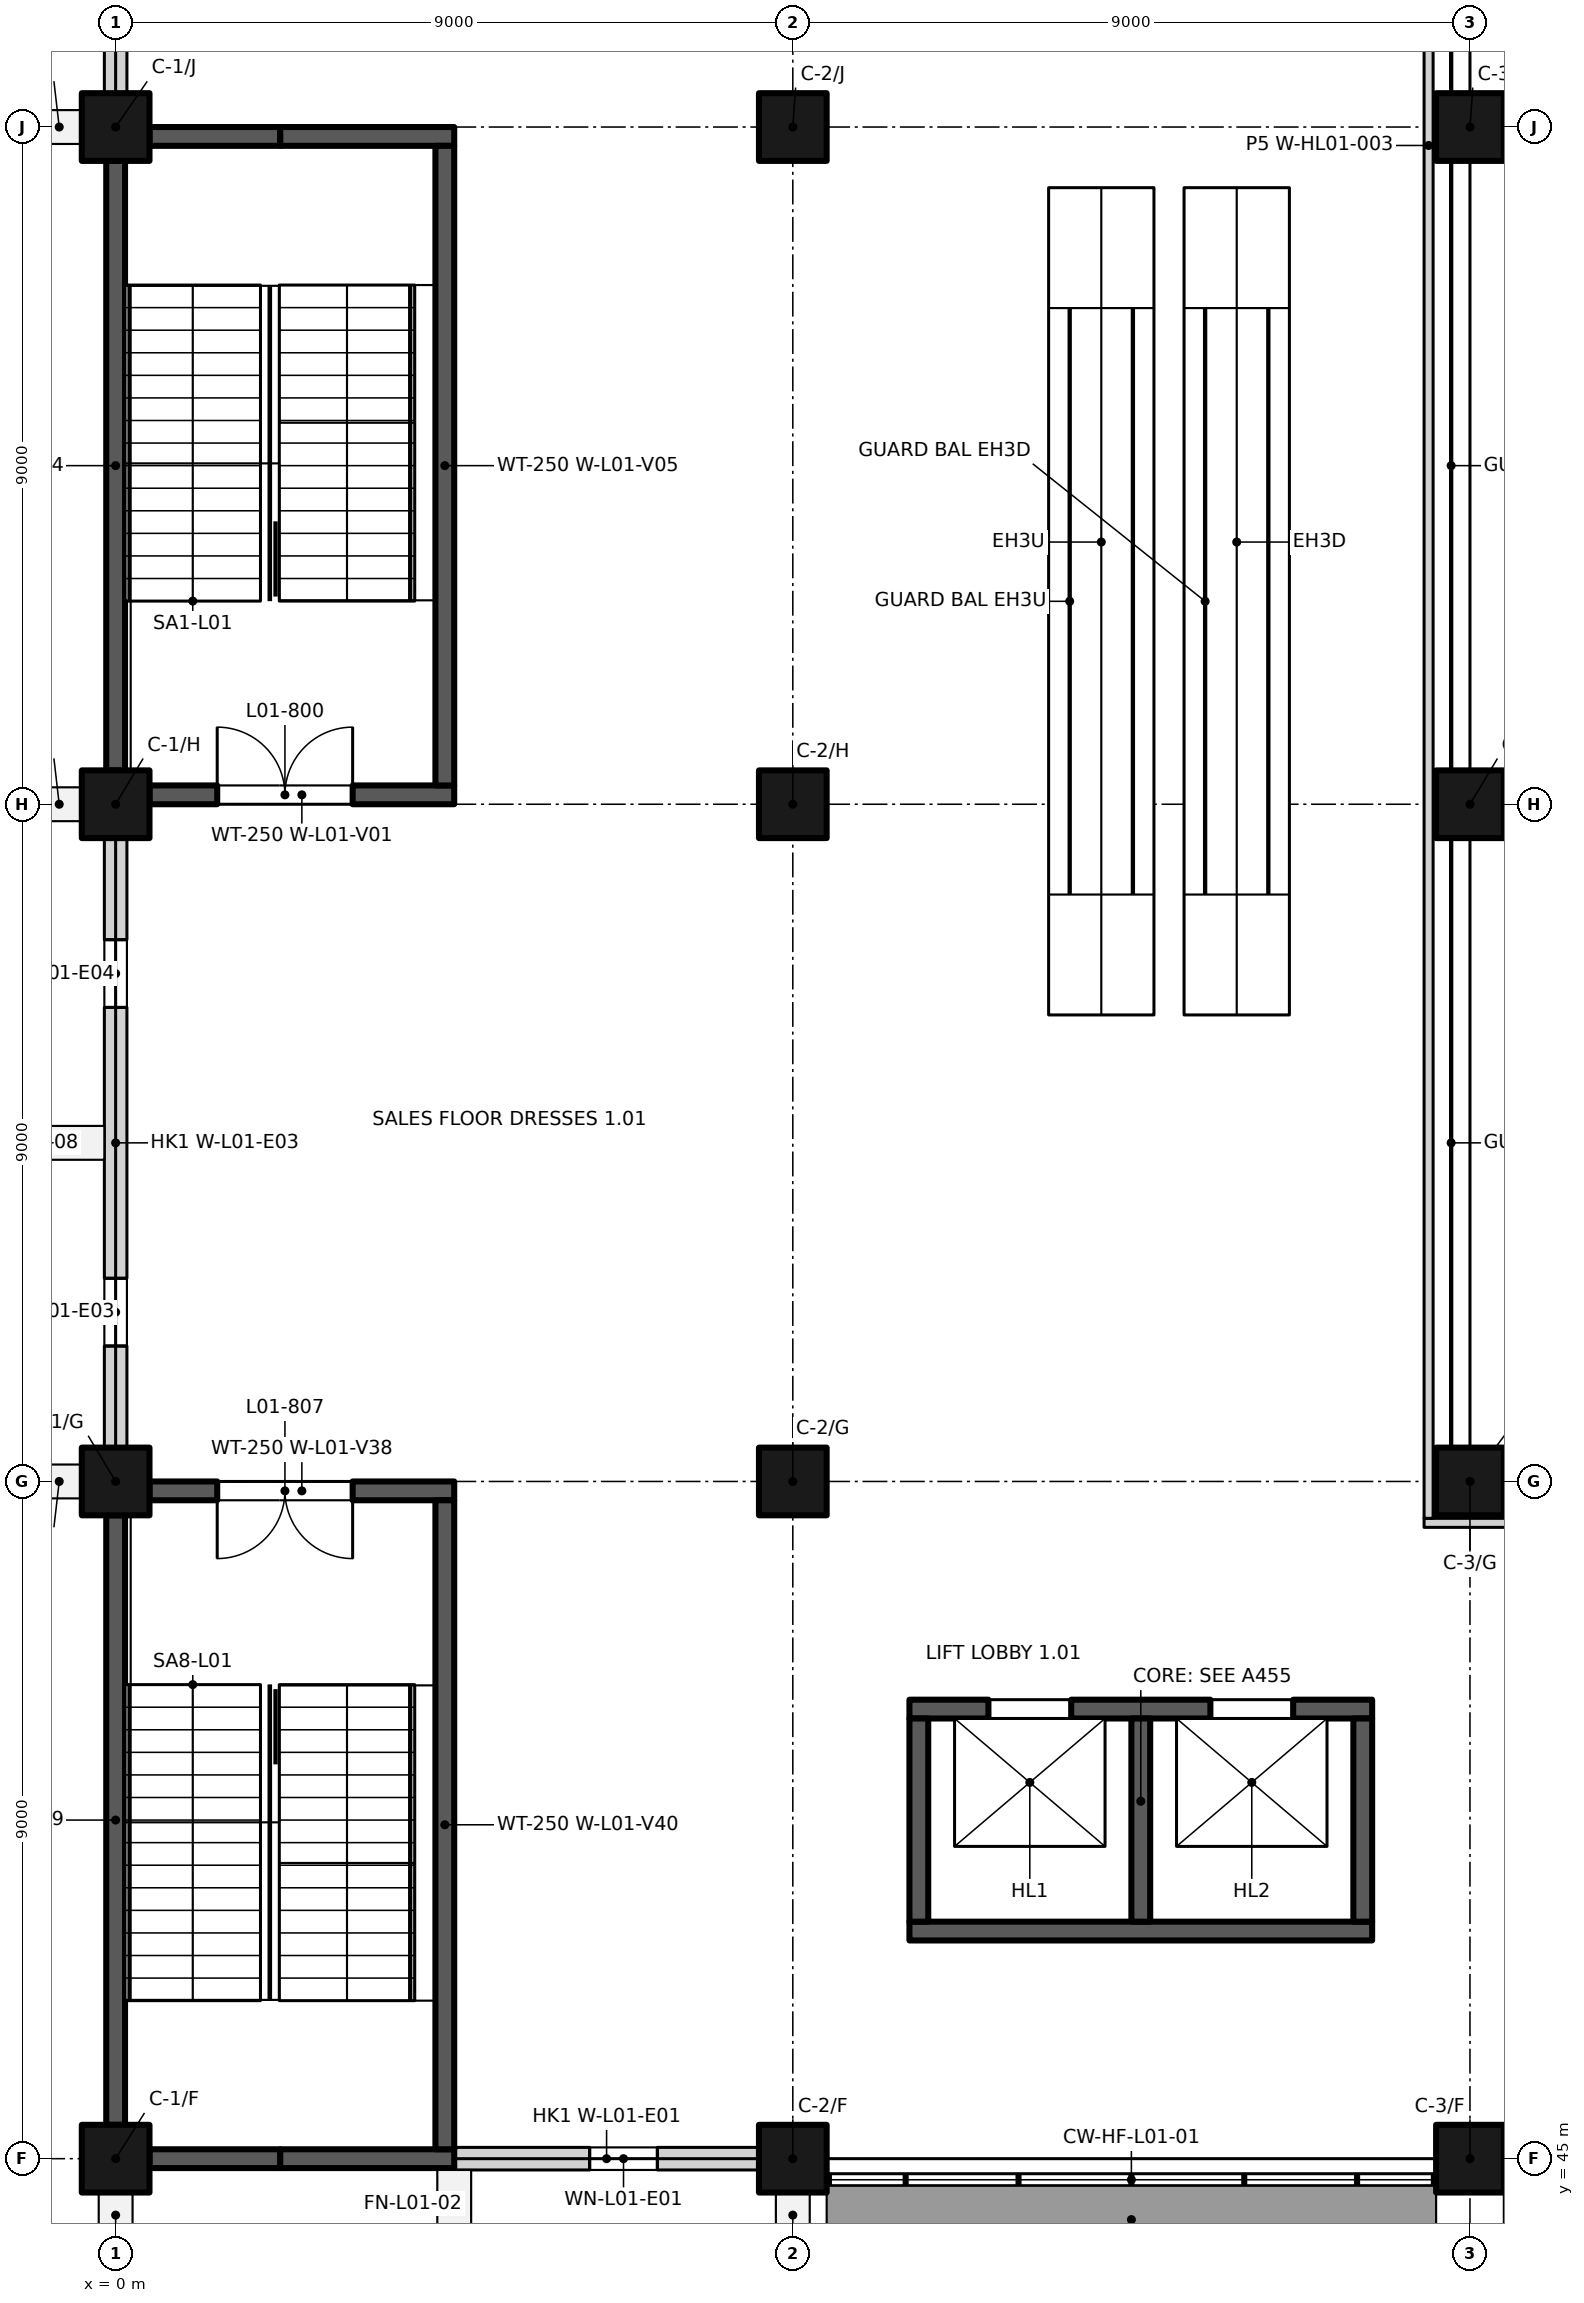
"""IFC4 building model, lengths in metres.
Left out: names, types, materials, properties, quantities, classifications, styles, units other than length and angle.
Written with IfcOpenShell. Run it as: python <this file> out.ifc"""

import sys

from ifc_helpers import new_model, si_unit, direction, frame, frame_2d, origin, origin_2d, place, context, subcontext, project, spatial, rectangle, extrude, element, fill, save


model = new_model("IFC4")
c1 = context("Model", 3, precision=1e-05, world=origin(), true_north=direction((0.0, 1.0)))
c2 = subcontext(c1, "Body", "Model", "MODEL_VIEW")
j1 = project(units=[si_unit("LENGTHUNIT", "METRE"), si_unit("PLANEANGLEUNIT", "RADIAN")], contexts=[c1])
p1 = place(None, origin())
s1 = spatial("IfcSite", under=j1, at=p1, CompositionType="ELEMENT")
p2 = place(p1, origin())
s2 = spatial("IfcBuilding", under=s1, at=p2, CompositionType="ELEMENT")
p3 = place(p2, frame((0.0, 0.0, 6.0)))
s3 = spatial("IfcBuildingStorey", under=s2, at=p3, CompositionType="ELEMENT", Elevation=6.0)
for number, where, z_axis, x_axis in (
    (1, (0.0, 45.0, 0.0), (0.0, 0.0, 1.0), (1.0, 0.0, 0.0)),
    (2, (9.0, 45.0, 0.0), (0.0, 0.0, 1.0), (1.0, 0.0, 0.0)),
    (3, (18.0, 45.0, 0.0), (0.0, 0.0, 1.0), (1.0, 0.0, 0.0)),
    (4, (0.0, 54.0, 0.0), (0.0, 0.0, 1.0), (1.0, 0.0, 0.0)),
    (5, (9.0, 54.0, 0.0), (0.0, 0.0, 1.0), (1.0, 0.0, 0.0)),
    (6, (18.0, 54.0, 0.0), (0.0, 0.0, 1.0), (1.0, 0.0, 0.0)),
    (7, (0.0, 63.0, 0.0), (0.0, 0.0, 1.0), (1.0, 0.0, 0.0)),
    (8, (9.0, 63.0, 0.0), (0.0, 0.0, 1.0), (1.0, 0.0, 0.0)),
    (9, (18.0, 63.0, 0.0), (0.0, 0.0, 1.0), (1.0, 0.0, 0.0)),
    (10, (0.0, 72.0, 0.0), (0.0, 0.0, 1.0), (1.0, 0.0, 0.0)),
    (11, (9.0, 72.0, 0.0), (0.0, 0.0, 1.0), (1.0, 0.0, 0.0)),
    (12, (18.0, 72.0, 0.0), (0.0, 0.0, 1.0), (1.0, 0.0, 0.0)),
):
    element("IfcColumn", number, at=place(p3, frame(where, z_axis=z_axis, x_axis=x_axis)), inside=s3, PredefinedType="COLUMN", context=c2, shape_type="SweptSolid", body=[
        extrude(rectangle(XDim=0.9, YDim=0.9, at=origin_2d()), origin(), (0.0, 0.0, 1.0), 4.5),
    ])
p4 = place(p3, frame((0.45, 63.125, 0.0), z_axis=(0.0, 0.0, 1.0), x_axis=(1.0, 0.0, 0.0)))
e13 = element("IfcWall", 13, at=p4, inside=s3, PredefinedType="SHEAR", context=c2, shape_type="SweptSolid", body=[
    extrude(rectangle(XDim=4.05, YDim=0.25, at=frame_2d((2.025, 0.0))), origin(), (0.0, 0.0, 1.0), 4.5),
])
p5 = place(p4, frame((0.9, 0.0, 0.0)))
e14 = element("IfcOpeningElement", 14, at=p5, cuts=e13, PredefinedType="OPENING", context=c2, shape_type="SweptSolid", body=[
    extrude(rectangle(XDim=1.8, YDim=2.1, at=frame_2d((0.9, 1.05))), frame((0.0, 0.135, 0.0), z_axis=(0.0, -1.0, 0.0), x_axis=(1.0, 0.0, 0.0)), (0.0, 0.0, 1.0), 0.27),
])
p6 = place(p3, frame((0.45, 71.875, 0.0), z_axis=(0.0, 0.0, 1.0), x_axis=(1.0, 0.0, 0.0)))
e15 = element("IfcWall", 15, at=p6, inside=s3, PredefinedType="SHEAR", context=c2, shape_type="SweptSolid", body=[
    extrude(rectangle(XDim=1.738, YDim=0.25, at=frame_2d((0.869, 0.0))), origin(), (0.0, 0.0, 1.0), 4.5),
])
p7 = place(p3, frame((2.188, 71.875, 0.0), z_axis=(0.0, 0.0, 1.0), x_axis=(1.0, 0.0, 0.0)))
e16 = element("IfcWall", 16, at=p7, inside=s3, PredefinedType="SHEAR", context=c2, shape_type="SweptSolid", body=[
    extrude(rectangle(XDim=2.312, YDim=0.25, at=frame_2d((1.156, 0.0))), origin(), (0.0, 0.0, 1.0), 4.5),
])
p8 = place(p3, frame((0.0, 63.45, 0.0), z_axis=(0.0, 0.0, 1.0), x_axis=(0.0, 1.0, 0.0)))
e17 = element("IfcWall", 17, at=p8, inside=s3, PredefinedType="SHEAR", context=c2, shape_type="SweptSolid", body=[
    extrude(rectangle(XDim=8.1, YDim=0.25, at=frame_2d((4.05, 0.0))), origin(), (0.0, 0.0, 1.0), 4.5),
])
p9 = place(p3, frame((4.375, 63.25, 0.0), z_axis=(0.0, 0.0, 1.0), x_axis=(0.0, 1.0, 0.0)))
e18 = element("IfcWall", 18, at=p9, inside=s3, PredefinedType="SHEAR", context=c2, shape_type="SweptSolid", body=[
    extrude(rectangle(XDim=8.5, YDim=0.25, at=frame_2d((4.25, 0.0))), origin(), (0.0, 0.0, 1.0), 4.5),
])
p10 = place(p3, frame((0.45, 45.0, 0.0), z_axis=(0.0, 0.0, 1.0), x_axis=(1.0, 0.0, 0.0)))
e19 = element("IfcWall", 19, at=p10, inside=s3, PredefinedType="SHEAR", context=c2, shape_type="SweptSolid", body=[
    extrude(rectangle(XDim=1.738, YDim=0.25, at=frame_2d((0.869, 0.0))), origin(), (0.0, 0.0, 1.0), 4.5),
])
p11 = place(p3, frame((2.188, 45.0, 0.0), z_axis=(0.0, 0.0, 1.0), x_axis=(1.0, 0.0, 0.0)))
e20 = element("IfcWall", 20, at=p11, inside=s3, PredefinedType="SHEAR", context=c2, shape_type="SweptSolid", body=[
    extrude(rectangle(XDim=2.312, YDim=0.25, at=frame_2d((1.156, 0.0))), origin(), (0.0, 0.0, 1.0), 4.5),
])
p12 = place(p3, frame((0.45, 53.875, 0.0), z_axis=(0.0, 0.0, 1.0), x_axis=(1.0, 0.0, 0.0)))
e21 = element("IfcWall", 21, at=p12, inside=s3, PredefinedType="SHEAR", context=c2, shape_type="SweptSolid", body=[
    extrude(rectangle(XDim=4.05, YDim=0.25, at=frame_2d((2.025, 0.0))), origin(), (0.0, 0.0, 1.0), 4.5),
])
p13 = place(p12, frame((2.7, 0.0, 0.0), z_axis=(0.0, 0.0, 1.0), x_axis=(-1.0, 0.0, 0.0)))
e22 = element("IfcOpeningElement", 22, at=p13, cuts=e21, PredefinedType="OPENING", context=c2, shape_type="SweptSolid", body=[
    extrude(rectangle(XDim=1.8, YDim=2.1, at=frame_2d((0.9, 1.05))), frame((0.0, 0.135, 0.0), z_axis=(0.0, -1.0, 0.0), x_axis=(1.0, 0.0, 0.0)), (0.0, 0.0, 1.0), 0.27),
])
p14 = place(p3, frame((0.0, 45.45, 0.0), z_axis=(0.0, 0.0, 1.0), x_axis=(0.0, 1.0, 0.0)))
e23 = element("IfcWall", 23, at=p14, inside=s3, PredefinedType="SHEAR", context=c2, shape_type="SweptSolid", body=[
    extrude(rectangle(XDim=8.1, YDim=0.25, at=frame_2d((4.05, 0.0))), origin(), (0.0, 0.0, 1.0), 4.5),
])
p15 = place(p3, frame((4.375, 45.125, 0.0), z_axis=(0.0, 0.0, 1.0), x_axis=(0.0, 1.0, 0.0)))
e24 = element("IfcWall", 24, at=p15, inside=s3, PredefinedType="SHEAR", context=c2, shape_type="SweptSolid", body=[
    extrude(rectangle(XDim=8.625, YDim=0.25, at=frame_2d((4.312, 0.0))), origin(), (0.0, 0.0, 1.0), 4.5),
])
p16 = place(p3, frame((10.55, 50.975, 0.0), z_axis=(0.0, 0.0, 1.0), x_axis=(1.0, 0.0, 0.0)))
e25 = element("IfcWall", 25, at=p16, inside=s3, PredefinedType="SHEAR", context=c2, shape_type="SweptSolid", body=[
    extrude(rectangle(XDim=6.15, YDim=0.25, at=frame_2d((3.075, 0.0))), origin(), (0.0, 0.0, 1.0), 4.5),
])
p17 = place(p16, frame((1.05, 0.0, 0.0)))
e26 = element("IfcOpeningElement", 26, at=p17, cuts=e25, PredefinedType="OPENING", context=c2, shape_type="SweptSolid", body=[
    extrude(rectangle(XDim=1.1, YDim=2.1, at=frame_2d((0.55, 1.05))), frame((0.0, 0.135, 0.0), z_axis=(0.0, -1.0, 0.0), x_axis=(1.0, 0.0, 0.0)), (0.0, 0.0, 1.0), 0.27),
])
p18 = place(p16, frame((4.0, 0.0, 0.0)))
e27 = element("IfcOpeningElement", 27, at=p18, cuts=e25, PredefinedType="OPENING", context=c2, shape_type="SweptSolid", body=[
    extrude(rectangle(XDim=1.1, YDim=2.1, at=frame_2d((0.55, 1.05))), frame((0.0, 0.135, 0.0), z_axis=(0.0, -1.0, 0.0), x_axis=(1.0, 0.0, 0.0)), (0.0, 0.0, 1.0), 0.27),
])
p19 = place(p3, frame((10.55, 48.025, 0.0), z_axis=(0.0, 0.0, 1.0), x_axis=(1.0, 0.0, 0.0)))
e28 = element("IfcWall", 28, at=p19, inside=s3, PredefinedType="SHEAR", context=c2, shape_type="SweptSolid", body=[
    extrude(rectangle(XDim=6.15, YDim=0.25, at=frame_2d((3.075, 0.0))), origin(), (0.0, 0.0, 1.0), 4.5),
])
for number, where, z_axis, x_axis in (
    (29, (10.675, 48.15, 0.0), (0.0, 0.0, 1.0), (0.0, 1.0, 0.0)),
    (30, (13.625, 48.15, 0.0), (0.0, 0.0, 1.0), (0.0, 1.0, 0.0)),
    (31, (16.575, 48.15, 0.0), (0.0, 0.0, 1.0), (0.0, 1.0, 0.0)),
):
    element("IfcWall", number, at=place(p3, frame(where, z_axis=z_axis, x_axis=x_axis)), inside=s3, PredefinedType="SHEAR", context=c2, shape_type="SweptSolid", body=[
        extrude(rectangle(XDim=2.7, YDim=0.25, at=frame_2d((1.35, 0.0))), origin(), (0.0, 0.0, 1.0), 4.5),
    ])
p20 = place(p3, frame((8.55, 45.0, 0.0), z_axis=(0.0, 0.0, 1.0), x_axis=(-1.0, 0.0, 0.0)))
e32 = element("IfcWall", 32, at=p20, inside=s3, PredefinedType="SOLIDWALL", context=c2, shape_type="SweptSolid", body=[
    extrude(rectangle(XDim=4.05, YDim=0.3, at=frame_2d((2.025, 0.0))), origin(), (0.0, 0.0, 1.0), 3.7),
])
p21 = place(p20, frame((1.35, 0.0, 0.45)))
e33 = element("IfcOpeningElement", 33, at=p21, cuts=e32, PredefinedType="OPENING", context=c2, shape_type="SweptSolid", body=[
    extrude(rectangle(XDim=0.9, YDim=3.0, at=frame_2d((0.45, 1.5))), frame((0.0, 0.16, 0.0), z_axis=(0.0, -1.0, 0.0), x_axis=(1.0, 0.0, 0.0)), (0.0, 0.0, 1.0), 0.32),
])
p22 = place(p3, frame((0.0, 54.45, 0.0), z_axis=(0.0, 0.0, 1.0), x_axis=(0.0, 1.0, 0.0)))
e34 = element("IfcWall", 34, at=p22, inside=s3, PredefinedType="SOLIDWALL", context=c2, shape_type="SweptSolid", body=[
    extrude(rectangle(XDim=8.1, YDim=0.3, at=frame_2d((4.05, 0.0))), origin(), (0.0, 0.0, 1.0), 3.7),
])
p23 = place(p22, frame((1.35, 0.0, 0.45)))
e35 = element("IfcOpeningElement", 35, at=p23, cuts=e34, PredefinedType="OPENING", context=c2, shape_type="SweptSolid", body=[
    extrude(rectangle(XDim=0.9, YDim=3.0, at=frame_2d((0.45, 1.5))), frame((0.0, 0.16, 0.0), z_axis=(0.0, -1.0, 0.0), x_axis=(1.0, 0.0, 0.0)), (0.0, 0.0, 1.0), 0.32),
])
p24 = place(p22, frame((5.85, 0.0, 0.45)))
e36 = element("IfcOpeningElement", 36, at=p24, cuts=e34, PredefinedType="OPENING", context=c2, shape_type="SweptSolid", body=[
    extrude(rectangle(XDim=0.9, YDim=3.0, at=frame_2d((0.45, 1.5))), frame((0.0, 0.16, 0.0), z_axis=(0.0, -1.0, 0.0), x_axis=(1.0, 0.0, 0.0)), (0.0, 0.0, 1.0), 0.32),
])
p25 = place(p3, frame((0.0, 72.45, 0.0), z_axis=(0.0, 0.0, 1.0), x_axis=(0.0, 1.0, 0.0)))
e37 = element("IfcWall", 37, at=p25, inside=s3, PredefinedType="SOLIDWALL", context=c2, shape_type="SweptSolid", body=[
    extrude(rectangle(XDim=8.1, YDim=0.3, at=frame_2d((4.05, 0.0))), origin(), (0.0, 0.0, 1.0), 3.7),
])
p26 = place(p25, frame((1.35, 0.0, 0.45)))
e38 = element("IfcOpeningElement", 38, at=p26, cuts=e37, PredefinedType="OPENING", context=c2, shape_type="SweptSolid", body=[
    extrude(rectangle(XDim=0.9, YDim=3.0, at=frame_2d((0.45, 1.5))), frame((0.0, 0.16, 0.0), z_axis=(0.0, -1.0, 0.0), x_axis=(1.0, 0.0, 0.0)), (0.0, 0.0, 1.0), 0.32),
])
p27 = place(p25, frame((5.85, 0.0, 0.45)))
e39 = element("IfcOpeningElement", 39, at=p27, cuts=e37, PredefinedType="OPENING", context=c2, shape_type="SweptSolid", body=[
    extrude(rectangle(XDim=0.9, YDim=3.0, at=frame_2d((0.45, 1.5))), frame((0.0, 0.16, 0.0), z_axis=(0.0, -1.0, 0.0), x_axis=(1.0, 0.0, 0.0)), (0.0, 0.0, 1.0), 0.32),
])
p28 = place(p3, frame((17.39, 53.45, 0.0), z_axis=(0.0, 0.0, 1.0), x_axis=(1.0, 0.0, 0.0)))
e40 = element("IfcWall", 40, at=p28, inside=s3, PredefinedType="PARTITIONING", context=c2, shape_type="SweptSolid", body=[
    extrude(rectangle(XDim=16.71, YDim=0.12, at=frame_2d((8.355, 0.0))), origin(), (0.0, 0.0, 1.0), 3.7),
])
p29 = place(p3, frame((17.45, 53.51, 0.0), z_axis=(0.0, 0.0, 1.0), x_axis=(0.0, 1.0, 0.0)))
e41 = element("IfcWall", 41, at=p29, inside=s3, PredefinedType="PARTITIONING", context=c2, shape_type="SweptSolid", body=[
    extrude(rectangle(XDim=36.655, YDim=0.12, at=frame_2d((18.328, 0.0))), origin(), (0.0, 0.0, 1.0), 3.7),
])
p30 = place(p5, origin())
e42 = element("IfcDoor", 42, at=p30, inside=s3, OperationType="DOUBLE_DOOR_SINGLE_SWING", PredefinedType="DOOR", context=c2, shape_type="SweptSolid", body=[
    extrude(rectangle(XDim=1.8, YDim=2.1, at=frame_2d((0.9, 1.05))), frame((0.0, 0.025, 0.0), z_axis=(0.0, -1.0, 0.0), x_axis=(1.0, 0.0, 0.0)), (0.0, 0.0, 1.0), 0.05),
])
fill(e14, e42)
p31 = place(p13, origin())
e43 = element("IfcDoor", 43, at=p31, inside=s3, OperationType="DOUBLE_DOOR_SINGLE_SWING", PredefinedType="DOOR", context=c2, shape_type="SweptSolid", body=[
    extrude(rectangle(XDim=1.8, YDim=2.1, at=frame_2d((0.9, 1.05))), frame((0.0, 0.025, 0.0), z_axis=(0.0, -1.0, 0.0), x_axis=(1.0, 0.0, 0.0)), (0.0, 0.0, 1.0), 0.05),
])
fill(e22, e43)
p32 = place(p17, origin())
e44 = element("IfcDoor", 44, at=p32, inside=s3, OperationType="DOUBLE_DOOR_SLIDING", PredefinedType="DOOR", context=c2, shape_type="SweptSolid", body=[
    extrude(rectangle(XDim=1.1, YDim=2.1, at=frame_2d((0.55, 1.05))), frame((0.0, 0.025, 0.0), z_axis=(0.0, -1.0, 0.0), x_axis=(1.0, 0.0, 0.0)), (0.0, 0.0, 1.0), 0.05),
])
fill(e26, e44)
p33 = place(p18, origin())
e45 = element("IfcDoor", 45, at=p33, inside=s3, OperationType="DOUBLE_DOOR_SLIDING", PredefinedType="DOOR", context=c2, shape_type="SweptSolid", body=[
    extrude(rectangle(XDim=1.1, YDim=2.1, at=frame_2d((0.55, 1.05))), frame((0.0, 0.025, 0.0), z_axis=(0.0, -1.0, 0.0), x_axis=(1.0, 0.0, 0.0)), (0.0, 0.0, 1.0), 0.05),
])
fill(e27, e45)
p34 = place(p21, origin())
e46 = element("IfcWindow", 46, at=p34, inside=s3, PartitioningType="SINGLE_PANEL", PredefinedType="WINDOW", context=c2, shape_type="SweptSolid", body=[
    extrude(rectangle(XDim=0.9, YDim=3.0, at=frame_2d((0.45, 1.5))), frame((0.0, -0.03, 0.0), z_axis=(0.0, -1.0, 0.0), x_axis=(1.0, 0.0, 0.0)), (0.0, 0.0, 1.0), 0.06),
])
fill(e33, e46)
p35 = place(p23, origin())
e47 = element("IfcWindow", 47, at=p35, inside=s3, PartitioningType="SINGLE_PANEL", PredefinedType="WINDOW", context=c2, shape_type="SweptSolid", body=[
    extrude(rectangle(XDim=0.9, YDim=3.0, at=frame_2d((0.45, 1.5))), frame((0.0, -0.03, 0.0), z_axis=(0.0, -1.0, 0.0), x_axis=(1.0, 0.0, 0.0)), (0.0, 0.0, 1.0), 0.06),
])
fill(e35, e47)
p36 = place(p24, origin())
e48 = element("IfcWindow", 48, at=p36, inside=s3, PartitioningType="SINGLE_PANEL", PredefinedType="WINDOW", context=c2, shape_type="SweptSolid", body=[
    extrude(rectangle(XDim=0.9, YDim=3.0, at=frame_2d((0.45, 1.5))), frame((0.0, -0.03, 0.0), z_axis=(0.0, -1.0, 0.0), x_axis=(1.0, 0.0, 0.0)), (0.0, 0.0, 1.0), 0.06),
])
fill(e36, e48)
save(model, sys.argv[1])
